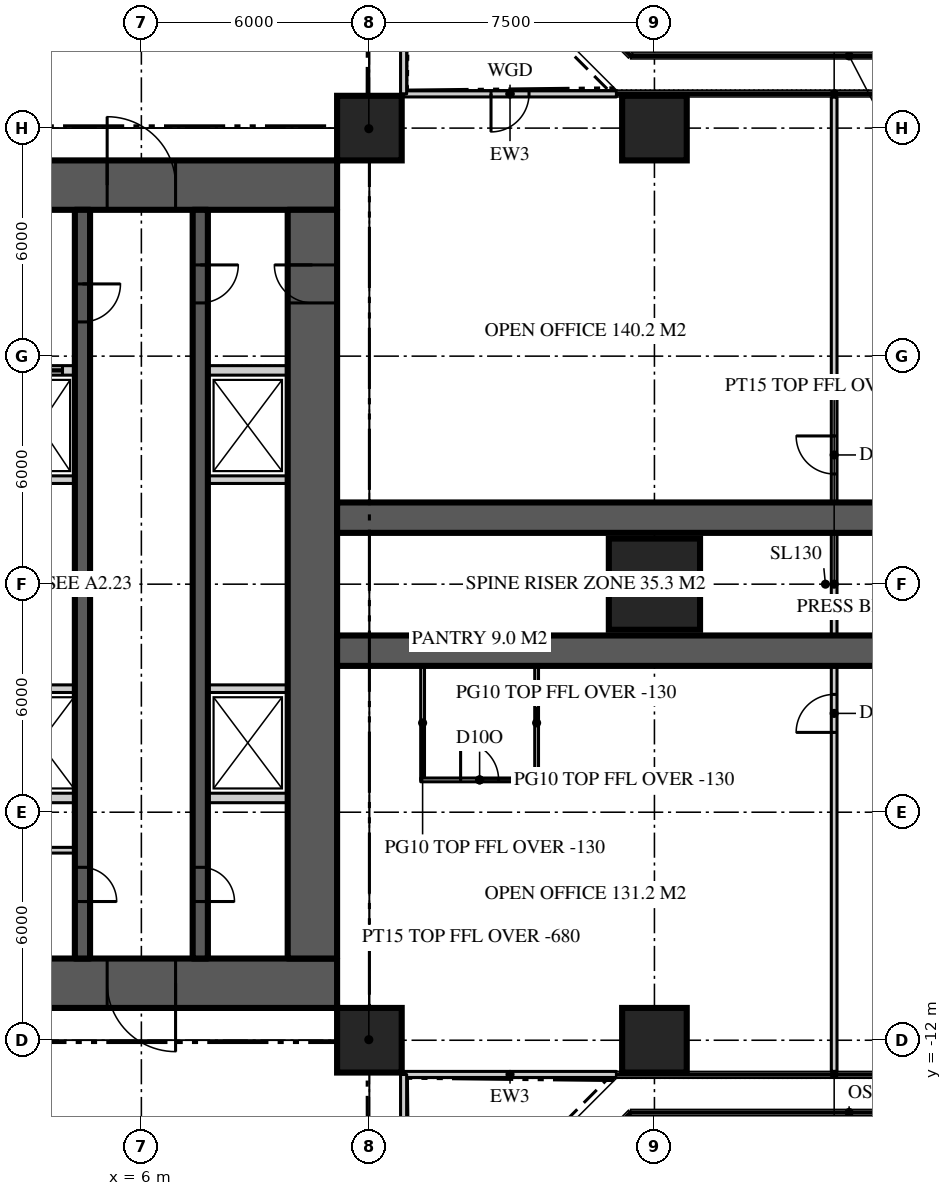
"""IFC4 building model, lengths in metres.
Left out: names, types, materials, properties, quantities, classifications, styles, units other than length and angle.
Written with IfcOpenShell. Run it as: python <this file> out.ifc"""

import sys

from ifc_helpers import new_model, si_unit, direction, frame, frame_2d, origin, origin_2d, place, context, subcontext, project, spatial, rectangle, extrude, element, fill, save


model = new_model("IFC4")
c1 = context("Model", 3, precision=1e-05, world=origin(), true_north=direction((0.0, 1.0)))
c2 = subcontext(c1, "Body", "Model", "MODEL_VIEW")
j1 = project(units=[si_unit("LENGTHUNIT", "METRE"), si_unit("PLANEANGLEUNIT", "RADIAN")], contexts=[c1])
p1 = place(None, origin())
s1 = spatial("IfcSite", under=j1, at=p1, CompositionType="ELEMENT")
p2 = place(p1, origin())
s2 = spatial("IfcBuilding", under=s1, at=p2, CompositionType="ELEMENT")
p3 = place(p2, frame((0.0, 0.0, 171.0)))
s3 = spatial("IfcBuildingStorey", under=s2, at=p3, CompositionType="ELEMENT", Elevation=171.0)
p4 = place(p3, frame((-11.15, 10.5, 0.0), z_axis=(0.0, 0.0, 1.0), x_axis=(1.0, 0.0, 0.0)))
e1 = element("IfcWall", 1, at=p4, inside=s3, PredefinedType="SHEAR", context=c2, shape_type="SweptSolid", body=[
    extrude(rectangle(XDim=22.3, YDim=1.3, at=frame_2d((11.15, 0.0))), origin(), (0.0, 0.0, 1.0), 3.9),
])
p5 = place(p4, frame((4.25, 0.0, 0.0)))
e2 = element("IfcOpeningElement", 2, at=p5, cuts=e1, PredefinedType="OPENING", context=c2, shape_type="SweptSolid", body=[
    extrude(rectangle(XDim=1.8, YDim=2.2, at=frame_2d((0.9, 1.1))), frame((0.0, 0.66, 0.0), z_axis=(0.0, -1.0, 0.0), x_axis=(1.0, 0.0, 0.0)), (0.0, 0.0, 1.0), 1.32),
])
p6 = place(p4, frame((16.25, 0.0, 0.0)))
e3 = element("IfcOpeningElement", 3, at=p6, cuts=e1, PredefinedType="OPENING", context=c2, shape_type="SweptSolid", body=[
    extrude(rectangle(XDim=1.8, YDim=2.2, at=frame_2d((0.9, 1.1))), frame((0.0, 0.66, 0.0), z_axis=(0.0, -1.0, 0.0), x_axis=(1.0, 0.0, 0.0)), (0.0, 0.0, 1.0), 1.32),
])
p7 = place(p3, frame((11.15, -10.5, 0.0), z_axis=(0.0, 0.0, 1.0), x_axis=(-1.0, 0.0, 0.0)))
e4 = element("IfcWall", 4, at=p7, inside=s3, PredefinedType="SHEAR", context=c2, shape_type="SweptSolid", body=[
    extrude(rectangle(XDim=22.3, YDim=1.3, at=frame_2d((11.15, 0.0))), origin(), (0.0, 0.0, 1.0), 3.9),
])
p8 = place(p7, frame((16.25, 0.0, 0.0)))
e5 = element("IfcOpeningElement", 5, at=p8, cuts=e4, PredefinedType="OPENING", context=c2, shape_type="SweptSolid", body=[
    extrude(rectangle(XDim=1.8, YDim=2.2, at=frame_2d((0.9, 1.1))), frame((0.0, 0.66, 0.0), z_axis=(0.0, -1.0, 0.0), x_axis=(1.0, 0.0, 0.0)), (0.0, 0.0, 1.0), 1.32),
])
p9 = place(p7, frame((4.25, 0.0, 0.0)))
e6 = element("IfcOpeningElement", 6, at=p9, cuts=e4, PredefinedType="OPENING", context=c2, shape_type="SweptSolid", body=[
    extrude(rectangle(XDim=1.8, YDim=2.2, at=frame_2d((0.9, 1.1))), frame((0.0, 0.66, 0.0), z_axis=(0.0, -1.0, 0.0), x_axis=(1.0, 0.0, 0.0)), (0.0, 0.0, 1.0), 1.32),
])
p10 = place(p3, frame((10.5, -9.85, 0.0), z_axis=(0.0, 0.0, 1.0), x_axis=(0.0, 1.0, 0.0)))
e7 = element("IfcWall", 7, at=p10, inside=s3, PredefinedType="SHEAR", context=c2, shape_type="SweptSolid", body=[
    extrude(rectangle(XDim=19.7, YDim=1.3, at=frame_2d((9.85, 0.0))), origin(), (0.0, 0.0, 1.0), 3.9),
])
p11 = place(p10, frame((17.25, 0.0, 0.0)))
e8 = element("IfcOpeningElement", 8, at=p11, cuts=e7, PredefinedType="OPENING", context=c2, shape_type="SweptSolid", body=[
    extrude(rectangle(XDim=1.0, YDim=2.2, at=frame_2d((0.5, 1.1))), frame((0.0, 0.66, 0.0), z_axis=(0.0, -1.0, 0.0), x_axis=(1.0, 0.0, 0.0)), (0.0, 0.0, 1.0), 1.32),
])
for number, where, z_axis, x_axis in (
    (9, (11.15, -1.75, 0.0), (0.0, 0.0, 1.0), (1.0, 0.0, 0.0)),
    (10, (11.15, 1.75, 0.0), (0.0, 0.0, 1.0), (1.0, 0.0, 0.0)),
):
    element("IfcWall", number, at=place(p3, frame(where, z_axis=z_axis, x_axis=x_axis)), inside=s3, PredefinedType="SHEAR", context=c2, shape_type="SweptSolid", body=[
        extrude(rectangle(XDim=15.25, YDim=0.8, at=frame_2d((7.625, 0.0))), origin(), (0.0, 0.0, 1.0), 3.9),
    ])
for number, where, z_axis, x_axis in (
    (11, (12.0, -12.0, 0.0), (0.0, 0.0, 1.0), (1.0, 0.0, 0.0)),
    (12, (19.5, -12.0, 0.0), (0.0, 0.0, 1.0), (1.0, 0.0, 0.0)),
):
    element("IfcColumn", number, at=place(p3, frame(where, z_axis=z_axis, x_axis=x_axis)), inside=s3, PredefinedType="COLUMN", context=c2, shape_type="SweptSolid", body=[
        extrude(rectangle(XDim=1.7, YDim=1.7, at=origin_2d()), origin(), (0.0, 0.0, 1.0), 3.9),
    ])
p12 = place(p3, frame((19.5, 0.0, 0.0), z_axis=(0.0, 0.0, 1.0), x_axis=(1.0, 0.0, 0.0)))
e13 = element("IfcColumn", 13, at=p12, inside=s3, PredefinedType="COLUMN", context=c2, shape_type="SweptSolid", body=[
    extrude(rectangle(XDim=2.4, YDim=2.4, at=origin_2d()), origin(), (0.0, 0.0, 1.0), 3.9),
])
for number, where, z_axis, x_axis in (
    (14, (12.0, 12.0, 0.0), (0.0, 0.0, 1.0), (1.0, 0.0, 0.0)),
    (15, (19.5, 12.0, 0.0), (0.0, 0.0, 1.0), (1.0, 0.0, 0.0)),
):
    element("IfcColumn", number, at=place(p3, frame(where, z_axis=z_axis, x_axis=x_axis)), inside=s3, PredefinedType="COLUMN", context=c2, shape_type="SweptSolid", body=[
        extrude(rectangle(XDim=1.7, YDim=1.7, at=origin_2d()), origin(), (0.0, 0.0, 1.0), 3.9),
    ])
p13 = place(p3, frame((12.9, -12.9, 0.0), z_axis=(0.0, 0.0, 1.0), x_axis=(1.0, 0.0, 0.0)))
e16 = element("IfcWall", 16, at=p13, inside=s3, PredefinedType="SOLIDWALL", context=c2, shape_type="SweptSolid", body=[
    extrude(rectangle(XDim=5.6, YDim=0.16, at=frame_2d((2.8, 0.0))), origin(), (0.0, 0.0, 1.0), 3.77),
])
p14 = place(p3, frame((18.5, 12.9, 0.0), z_axis=(0.0, 0.0, 1.0), x_axis=(-1.0, 0.0, 0.0)))
e17 = element("IfcWall", 17, at=p14, inside=s3, PredefinedType="SOLIDWALL", context=c2, shape_type="SweptSolid", body=[
    extrude(rectangle(XDim=5.6, YDim=0.16, at=frame_2d((2.8, 0.0))), origin(), (0.0, 0.0, 1.0), 3.77),
])
p15 = place(p14, frame((2.3, 0.0, 0.0)))
e18 = element("IfcOpeningElement", 18, at=p15, cuts=e17, PredefinedType="OPENING", context=c2, shape_type="SweptSolid", body=[
    extrude(rectangle(XDim=1.0, YDim=2.2, at=frame_2d((0.5, 1.1))), frame((0.0, 0.09, 0.0), z_axis=(0.0, -1.0, 0.0), x_axis=(1.0, 0.0, 0.0)), (0.0, 0.0, 1.0), 0.18),
])
p16 = place(p3, frame((12.9, 12.9, 0.0), z_axis=(0.0, 0.0, 1.0), x_axis=(0.0, 1.0, 0.0)))
e19 = element("IfcWall", 19, at=p16, inside=s3, PredefinedType="SOLIDWALL", context=c2, shape_type="SweptSolid", body=[
    extrude(rectangle(XDim=5.6, YDim=0.16, at=frame_2d((2.8, 0.0))), origin(), (0.0, 0.0, 1.0), 3.77),
])
p17 = place(p3, frame((12.9, -18.5, 0.0), z_axis=(0.0, 0.0, 1.0), x_axis=(0.0, 1.0, 0.0)))
e20 = element("IfcWall", 20, at=p17, inside=s3, PredefinedType="SOLIDWALL", context=c2, shape_type="SweptSolid", body=[
    extrude(rectangle(XDim=5.6, YDim=0.16, at=frame_2d((2.8, 0.0))), origin(), (0.0, 0.0, 1.0), 3.77),
])
p18 = place(p17, frame((2.3, 0.0, 0.0)))
e21 = element("IfcOpeningElement", 21, at=p18, cuts=e20, PredefinedType="OPENING", context=c2, shape_type="SweptSolid", body=[
    extrude(rectangle(XDim=1.0, YDim=2.2, at=frame_2d((0.5, 1.1))), frame((0.0, 0.09, 0.0), z_axis=(0.0, -1.0, 0.0), x_axis=(1.0, 0.0, 0.0)), (0.0, 0.0, 1.0), 0.18),
])
p19 = place(p3, frame((7.55, 9.85, 0.0), z_axis=(0.0, 0.0, 1.0), x_axis=(0.0, -1.0, 0.0)))
e22 = element("IfcWall", 22, at=p19, inside=s3, PredefinedType="SHEAR", context=c2, shape_type="SweptSolid", body=[
    extrude(rectangle(XDim=19.7, YDim=0.4, at=frame_2d((9.85, 0.0))), origin(), (0.0, 0.0, 1.0), 3.9),
])
p20 = place(p19, frame((1.45, 0.0, 0.0)))
e23 = element("IfcOpeningElement", 23, at=p20, cuts=e22, PredefinedType="OPENING", context=c2, shape_type="SweptSolid", body=[
    extrude(rectangle(XDim=1.0, YDim=2.2, at=frame_2d((0.5, 1.1))), frame((0.0, 0.21, 0.0), z_axis=(0.0, -1.0, 0.0), x_axis=(1.0, 0.0, 0.0)), (0.0, 0.0, 1.0), 0.42),
])
p21 = place(p19, frame((17.3, 0.0, 0.0)))
e24 = element("IfcOpeningElement", 24, at=p21, cuts=e22, PredefinedType="OPENING", context=c2, shape_type="SweptSolid", body=[
    extrude(rectangle(XDim=0.9, YDim=2.1, at=frame_2d((0.45, 1.05))), frame((0.0, 0.21, 0.0), z_axis=(0.0, -1.0, 0.0), x_axis=(1.0, 0.0, 0.0)), (0.0, 0.0, 1.0), 0.42),
])
p22 = place(p3, frame((4.45, 9.85, 0.0), z_axis=(0.0, 0.0, 1.0), x_axis=(0.0, -1.0, 0.0)))
e25 = element("IfcWall", 25, at=p22, inside=s3, PredefinedType="SHEAR", context=c2, shape_type="SweptSolid", body=[
    extrude(rectangle(XDim=19.7, YDim=0.4, at=frame_2d((9.85, 0.0))), origin(), (0.0, 0.0, 1.0), 3.9),
])
p23 = place(p22, frame((1.95, 0.0, 0.0)))
e26 = element("IfcOpeningElement", 26, at=p23, cuts=e25, PredefinedType="OPENING", context=c2, shape_type="SweptSolid", body=[
    extrude(rectangle(XDim=1.0, YDim=2.2, at=frame_2d((0.5, 1.1))), frame((0.0, 0.21, 0.0), z_axis=(0.0, -1.0, 0.0), x_axis=(1.0, 0.0, 0.0)), (0.0, 0.0, 1.0), 0.42),
])
p24 = place(p22, frame((17.3, 0.0, 0.0)))
e27 = element("IfcOpeningElement", 27, at=p24, cuts=e25, PredefinedType="OPENING", context=c2, shape_type="SweptSolid", body=[
    extrude(rectangle(XDim=0.9, YDim=2.1, at=frame_2d((0.45, 1.05))), frame((0.0, 0.21, 0.0), z_axis=(0.0, -1.0, 0.0), x_axis=(1.0, 0.0, 0.0)), (0.0, 0.0, 1.0), 0.42),
])
p25 = place(p3, frame((2.4, 5.625, 0.0), z_axis=(0.0, 0.0, 1.0), x_axis=(1.0, 0.0, 0.0)))
e28 = element("IfcWall", 28, at=p25, inside=s3, PredefinedType="SOLIDWALL", context=c2, shape_type="SweptSolid", body=[
    extrude(rectangle(XDim=1.85, YDim=0.25, at=frame_2d((0.925, 0.0))), origin(), (0.0, 0.0, 1.0), 3.7),
])
p26 = place(p25, frame((0.325, 0.0, 0.0)))
e29 = element("IfcOpeningElement", 29, at=p26, cuts=e28, PredefinedType="OPENING", context=c2, shape_type="SweptSolid", body=[
    extrude(rectangle(XDim=1.2, YDim=2.2, at=frame_2d((0.6, 1.1))), frame((0.0, 0.135, 0.0), z_axis=(0.0, -1.0, 0.0), x_axis=(1.0, 0.0, 0.0)), (0.0, 0.0, 1.0), 0.27),
])
p27 = place(p3, frame((7.75, 5.625, 0.0), z_axis=(0.0, 0.0, 1.0), x_axis=(1.0, 0.0, 0.0)))
e30 = element("IfcWall", 30, at=p27, inside=s3, PredefinedType="SOLIDWALL", context=c2, shape_type="SweptSolid", body=[
    extrude(rectangle(XDim=2.1, YDim=0.25, at=frame_2d((1.05, 0.0))), origin(), (0.0, 0.0, 1.0), 3.7),
])
p28 = place(p3, frame((2.4, -5.625, 0.0), z_axis=(0.0, 0.0, 1.0), x_axis=(1.0, 0.0, 0.0)))
e31 = element("IfcWall", 31, at=p28, inside=s3, PredefinedType="SOLIDWALL", context=c2, shape_type="SweptSolid", body=[
    extrude(rectangle(XDim=1.85, YDim=0.25, at=frame_2d((0.925, 0.0))), origin(), (0.0, 0.0, 1.0), 3.7),
])
p29 = place(p3, frame((7.75, -5.625, 0.0), z_axis=(0.0, 0.0, 1.0), x_axis=(1.0, 0.0, 0.0)))
e32 = element("IfcWall", 32, at=p29, inside=s3, PredefinedType="SOLIDWALL", context=c2, shape_type="SweptSolid", body=[
    extrude(rectangle(XDim=2.1, YDim=0.25, at=frame_2d((1.05, 0.0))), origin(), (0.0, 0.0, 1.0), 3.7),
])
p30 = place(p3, frame((2.4, -2.75, 0.0), z_axis=(0.0, 0.0, 1.0), x_axis=(1.0, 0.0, 0.0)))
e33 = element("IfcWall", 33, at=p30, inside=s3, PredefinedType="SOLIDWALL", context=c2, shape_type="SweptSolid", body=[
    extrude(rectangle(XDim=1.85, YDim=0.2, at=frame_2d((0.925, 0.0))), origin(), (0.0, 0.0, 1.0), 3.7),
])
p31 = place(p3, frame((7.75, -2.75, 0.0), z_axis=(0.0, 0.0, 1.0), x_axis=(1.0, 0.0, 0.0)))
e34 = element("IfcWall", 34, at=p31, inside=s3, PredefinedType="SOLIDWALL", context=c2, shape_type="SweptSolid", body=[
    extrude(rectangle(XDim=2.1, YDim=0.2, at=frame_2d((1.05, 0.0))), origin(), (0.0, 0.0, 1.0), 3.7),
])
p32 = place(p3, frame((2.4, 2.75, 0.0), z_axis=(0.0, 0.0, 1.0), x_axis=(1.0, 0.0, 0.0)))
e35 = element("IfcWall", 35, at=p32, inside=s3, PredefinedType="SOLIDWALL", context=c2, shape_type="SweptSolid", body=[
    extrude(rectangle(XDim=1.85, YDim=0.2, at=frame_2d((0.925, 0.0))), origin(), (0.0, 0.0, 1.0), 3.7),
])
p33 = place(p3, frame((7.75, 2.75, 0.0), z_axis=(0.0, 0.0, 1.0), x_axis=(1.0, 0.0, 0.0)))
e36 = element("IfcWall", 36, at=p33, inside=s3, PredefinedType="SOLIDWALL", context=c2, shape_type="SweptSolid", body=[
    extrude(rectangle(XDim=2.1, YDim=0.2, at=frame_2d((1.05, 0.0))), origin(), (0.0, 0.0, 1.0), 3.7),
])
p34 = place(p3, frame((24.229, -12.82, 0.0), z_axis=(0.0, 0.0, 1.0), x_axis=(0.0, 1.0, 0.0)))
e37 = element("IfcWall", 37, at=p34, inside=s3, PredefinedType="PARTITIONING", context=c2, shape_type="SweptSolid", body=[
    extrude(rectangle(XDim=25.64, YDim=0.15, at=frame_2d((12.82, 0.0))), origin(), (0.0, 0.0, 1.0), 3.77),
])
p35 = place(p34, frame((15.72, 0.0, 0.0)))
e38 = element("IfcOpeningElement", 38, at=p35, cuts=e37, PredefinedType="OPENING", context=c2, shape_type="SweptSolid", body=[
    extrude(rectangle(XDim=1.0, YDim=2.2, at=frame_2d((0.5, 1.1))), frame((0.0, 0.085, 0.0), z_axis=(0.0, -1.0, 0.0), x_axis=(1.0, 0.0, 0.0)), (0.0, 0.0, 1.0), 0.17),
])
p36 = place(p34, frame((8.92, 0.0, 0.0)))
e39 = element("IfcOpeningElement", 39, at=p36, cuts=e37, PredefinedType="OPENING", context=c2, shape_type="SweptSolid", body=[
    extrude(rectangle(XDim=1.0, YDim=2.2, at=frame_2d((0.5, 1.1))), frame((0.0, 0.085, 0.0), z_axis=(0.0, -1.0, 0.0), x_axis=(1.0, 0.0, 0.0)), (0.0, 0.0, 1.0), 0.17),
])
for number, where, z_axis, x_axis in (
    (40, (13.4, -2.15, 0.0), (0.0, 0.0, 1.0), (0.0, -1.0, 0.0)),
    (41, (16.4, -2.15, 0.0), (0.0, 0.0, 1.0), (0.0, -1.0, 0.0)),
):
    element("IfcWall", number, at=place(p3, frame(where, z_axis=z_axis, x_axis=x_axis)), inside=s3, PredefinedType="PARTITIONING", context=c2, shape_type="SweptSolid", body=[
        extrude(rectangle(XDim=3.0, YDim=0.1, at=frame_2d((1.5, 0.0))), origin(), (0.0, 0.0, 1.0), 3.77),
    ])
p37 = place(p3, frame((13.35, -5.15, 0.0), z_axis=(0.0, 0.0, 1.0), x_axis=(1.0, 0.0, 0.0)))
e42 = element("IfcWall", 42, at=p37, inside=s3, PredefinedType="PARTITIONING", context=c2, shape_type="SweptSolid", body=[
    extrude(rectangle(XDim=3.1, YDim=0.1, at=frame_2d((1.55, 0.0))), origin(), (0.0, 0.0, 1.0), 3.77),
])
p38 = place(p37, frame((1.05, 0.0, 0.0)))
e43 = element("IfcOpeningElement", 43, at=p38, cuts=e42, PredefinedType="OPENING", context=c2, shape_type="SweptSolid", body=[
    extrude(rectangle(XDim=1.0, YDim=2.2, at=frame_2d((0.5, 1.1))), frame((0.0, 0.06, 0.0), z_axis=(0.0, -1.0, 0.0), x_axis=(1.0, 0.0, 0.0)), (0.0, 0.0, 1.0), 0.12),
])
for number, where, z_axis, x_axis in (
    (44, (11.15, 11.15, 0.0), (0.0, 0.0, 1.0), (0.707, 0.707, 0.0)),
    (45, (11.15, -11.15, 0.0), (0.0, 0.0, 1.0), (0.707, -0.707, 0.0)),
):
    element("IfcWall", number, at=place(p3, frame(where, z_axis=z_axis, x_axis=x_axis)), inside=s3, PredefinedType="PARTITIONING", context=c2, shape_type="SweptSolid", body=[
        extrude(rectangle(XDim=2.362, YDim=0.15, at=frame_2d((1.181, 0.0))), origin(), (0.0, 0.0, 1.0), 3.22),
    ])
p39 = place(p3, frame((2.4, -7.0, 0.0), z_axis=(0.0, 0.0, 1.0), x_axis=(1.0, 0.0, 0.0)))
e46 = element("IfcWall", 46, at=p39, inside=s3, PredefinedType="SOLIDWALL", context=c2, shape_type="SweptSolid", body=[
    extrude(rectangle(XDim=1.85, YDim=0.15, at=frame_2d((0.925, 0.0))), origin(), (0.0, 0.0, 1.0), 3.77),
])
p40 = place(p39, frame((0.1, 0.0, 0.0)))
e47 = element("IfcOpeningElement", 47, at=p40, cuts=e46, PredefinedType="OPENING", context=c2, shape_type="SweptSolid", body=[
    extrude(rectangle(XDim=0.9, YDim=2.1, at=frame_2d((0.45, 1.05))), frame((0.0, 0.085, 0.0), z_axis=(0.0, -1.0, 0.0), x_axis=(1.0, 0.0, 0.0)), (0.0, 0.0, 1.0), 0.17),
])
p41 = place(p15, origin())
e48 = element("IfcDoor", 48, at=p41, inside=s3, OperationType="SINGLE_SWING_RIGHT", PredefinedType="DOOR", context=c2, shape_type="SweptSolid", body=[
    extrude(rectangle(XDim=1.0, YDim=2.2, at=frame_2d((0.5, 1.1))), frame((0.0, 0.025, 0.0), z_axis=(0.0, -1.0, 0.0), x_axis=(1.0, 0.0, 0.0)), (0.0, 0.0, 1.0), 0.05),
])
fill(e18, e48)
p42 = place(p6, origin())
e49 = element("IfcDoor", 49, at=p42, inside=s3, OperationType="DOUBLE_DOOR_DOUBLE_SWING", PredefinedType="DOOR", context=c2, shape_type="SweptSolid", body=[
    extrude(rectangle(XDim=1.8, YDim=2.2, at=frame_2d((0.9, 1.1))), frame((0.0, 0.025, 0.0), z_axis=(0.0, -1.0, 0.0), x_axis=(1.0, 0.0, 0.0)), (0.0, 0.0, 1.0), 0.05),
])
fill(e3, e49)
p43 = place(p9, origin())
e50 = element("IfcDoor", 50, at=p43, inside=s3, OperationType="DOUBLE_DOOR_DOUBLE_SWING", PredefinedType="DOOR", context=c2, shape_type="SweptSolid", body=[
    extrude(rectangle(XDim=1.8, YDim=2.2, at=frame_2d((0.9, 1.1))), frame((0.0, 0.025, 0.0), z_axis=(0.0, -1.0, 0.0), x_axis=(1.0, 0.0, 0.0)), (0.0, 0.0, 1.0), 0.05),
])
fill(e6, e50)
p44 = place(p20, origin())
e51 = element("IfcDoor", 51, at=p44, inside=s3, OperationType="SINGLE_SWING_LEFT", PredefinedType="DOOR", context=c2, shape_type="SweptSolid", body=[
    extrude(rectangle(XDim=1.0, YDim=2.2, at=frame_2d((0.5, 1.1))), frame((0.0, 0.025, 0.0), z_axis=(0.0, -1.0, 0.0), x_axis=(1.0, 0.0, 0.0)), (0.0, 0.0, 1.0), 0.05),
])
fill(e23, e51)
p45 = place(p11, origin())
e52 = element("IfcDoor", 52, at=p45, inside=s3, OperationType="SINGLE_SWING_RIGHT", PredefinedType="DOOR", context=c2, shape_type="SweptSolid", body=[
    extrude(rectangle(XDim=1.0, YDim=2.2, at=frame_2d((0.5, 1.1))), frame((0.0, 0.025, 0.0), z_axis=(0.0, -1.0, 0.0), x_axis=(1.0, 0.0, 0.0)), (0.0, 0.0, 1.0), 0.05),
])
fill(e8, e52)
p46 = place(p23, origin())
e53 = element("IfcDoor", 53, at=p46, inside=s3, OperationType="SINGLE_SWING_LEFT", PredefinedType="DOOR", context=c2, shape_type="SweptSolid", body=[
    extrude(rectangle(XDim=1.0, YDim=2.2, at=frame_2d((0.5, 1.1))), frame((0.0, 0.025, 0.0), z_axis=(0.0, -1.0, 0.0), x_axis=(1.0, 0.0, 0.0)), (0.0, 0.0, 1.0), 0.05),
])
fill(e26, e53)
p47 = place(p21, origin())
e54 = element("IfcDoor", 54, at=p47, inside=s3, OperationType="SINGLE_SWING_RIGHT", PredefinedType="DOOR", context=c2, shape_type="SweptSolid", body=[
    extrude(rectangle(XDim=0.9, YDim=2.1, at=frame_2d((0.45, 1.05))), frame((0.0, 0.025, 0.0), z_axis=(0.0, -1.0, 0.0), x_axis=(1.0, 0.0, 0.0)), (0.0, 0.0, 1.0), 0.05),
])
fill(e24, e54)
p48 = place(p24, origin())
e55 = element("IfcDoor", 55, at=p48, inside=s3, OperationType="SINGLE_SWING_RIGHT", PredefinedType="DOOR", context=c2, shape_type="SweptSolid", body=[
    extrude(rectangle(XDim=0.9, YDim=2.1, at=frame_2d((0.45, 1.05))), frame((0.0, 0.025, 0.0), z_axis=(0.0, -1.0, 0.0), x_axis=(1.0, 0.0, 0.0)), (0.0, 0.0, 1.0), 0.05),
])
fill(e27, e55)
p49 = place(p26, origin())
e56 = element("IfcDoor", 56, at=p49, inside=s3, OperationType="SLIDING_TO_LEFT", PredefinedType="DOOR", context=c2, shape_type="SweptSolid", body=[
    extrude(rectangle(XDim=1.2, YDim=2.2, at=frame_2d((0.6, 1.1))), frame((0.0, 0.025, 0.0), z_axis=(0.0, -1.0, 0.0), x_axis=(1.0, 0.0, 0.0)), (0.0, 0.0, 1.0), 0.05),
])
fill(e29, e56)
p50 = place(p35, origin())
e57 = element("IfcDoor", 57, at=p50, inside=s3, OperationType="SINGLE_SWING_RIGHT", PredefinedType="DOOR", context=c2, shape_type="SweptSolid", body=[
    extrude(rectangle(XDim=1.0, YDim=2.2, at=frame_2d((0.5, 1.1))), frame((0.0, 0.025, 0.0), z_axis=(0.0, -1.0, 0.0), x_axis=(1.0, 0.0, 0.0)), (0.0, 0.0, 1.0), 0.05),
])
fill(e38, e57)
p51 = place(p36, origin())
e58 = element("IfcDoor", 58, at=p51, inside=s3, OperationType="SINGLE_SWING_LEFT", PredefinedType="DOOR", context=c2, shape_type="SweptSolid", body=[
    extrude(rectangle(XDim=1.0, YDim=2.2, at=frame_2d((0.5, 1.1))), frame((0.0, 0.025, 0.0), z_axis=(0.0, -1.0, 0.0), x_axis=(1.0, 0.0, 0.0)), (0.0, 0.0, 1.0), 0.05),
])
fill(e39, e58)
p52 = place(p38, origin())
e59 = element("IfcDoor", 59, at=p52, inside=s3, OperationType="SINGLE_SWING_LEFT", PredefinedType="DOOR", context=c2, shape_type="SweptSolid", body=[
    extrude(rectangle(XDim=1.0, YDim=2.2, at=frame_2d((0.5, 1.1))), frame((0.0, 0.025, 0.0), z_axis=(0.0, -1.0, 0.0), x_axis=(1.0, 0.0, 0.0)), (0.0, 0.0, 1.0), 0.05),
])
fill(e43, e59)
save(model, sys.argv[1])
